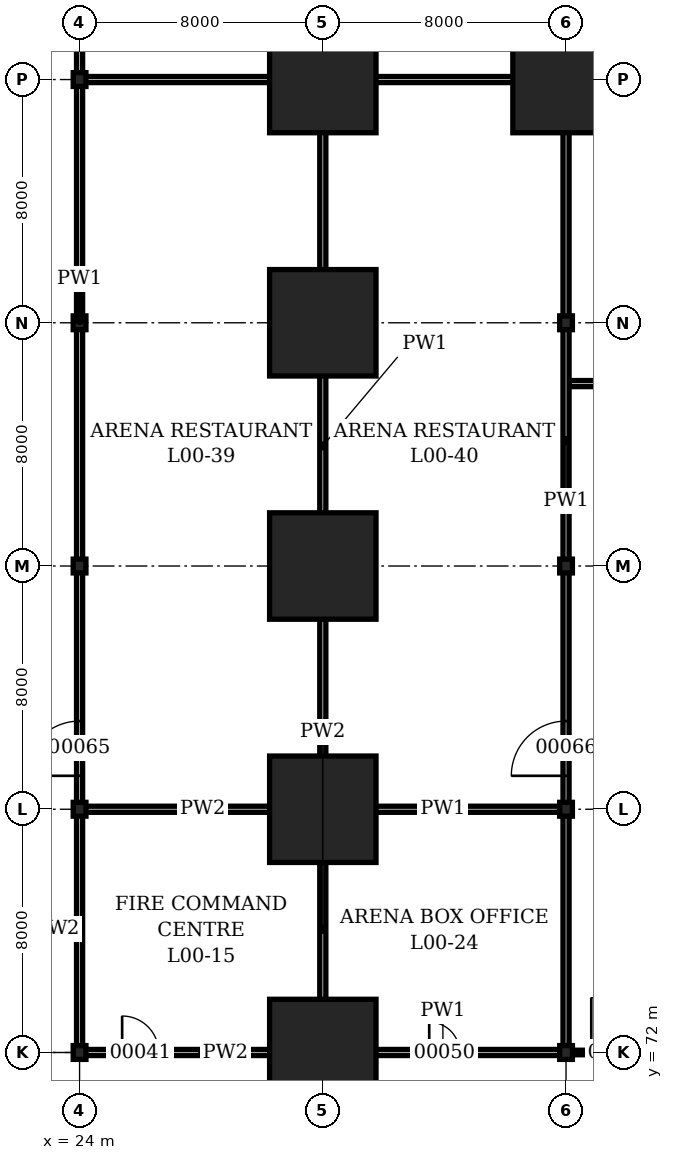
"""IFC4 building model, lengths in metres.
Left out: names, types, materials, properties, quantities, classifications, styles, units other than length and angle.
Written with IfcOpenShell. Run it as: python <this file> out.ifc"""

import sys

from ifc_helpers import new_model, si_unit, direction, frame, frame_2d, origin, origin_2d, place, context, subcontext, project, spatial, rectangle, hollow_rectangle, i_section, extrude, element, fill, save


model = new_model("IFC4")
c1 = context("Model", 3, precision=1e-05, world=origin(), true_north=direction((0.0, 1.0)))
c2 = subcontext(c1, "Body", "Model", "MODEL_VIEW")
j1 = project(units=[si_unit("LENGTHUNIT", "METRE"), si_unit("PLANEANGLEUNIT", "RADIAN")], contexts=[c1])
p1 = place(None, origin())
s1 = spatial("IfcSite", under=j1, at=p1, CompositionType="ELEMENT")
p2 = place(p1, origin())
s2 = spatial("IfcBuilding", under=s1, at=p2, CompositionType="ELEMENT")
p3 = place(p2, origin())
s3 = spatial("IfcBuildingStorey", under=s2, at=p3, CompositionType="ELEMENT", Elevation=0.0)
for number, where, z_axis, x_axis in (
    (1, (24.0, 72.0, 0.0), (0.0, 0.0, 1.0), (1.0, 0.0, 0.0)),
    (2, (24.0, 80.0, 0.0), (0.0, 0.0, 1.0), (1.0, 0.0, 0.0)),
    (3, (24.0, 88.0, 0.0), (0.0, 0.0, 1.0), (1.0, 0.0, 0.0)),
    (4, (24.0, 96.0, 0.0), (0.0, 0.0, 1.0), (1.0, 0.0, 0.0)),
    (5, (24.0, 104.0, 0.0), (0.0, 0.0, 1.0), (1.0, 0.0, 0.0)),
):
    element("IfcColumn", number, at=place(p3, frame(where, z_axis=z_axis, x_axis=x_axis)), inside=s3, PredefinedType="COLUMN", context=c2, shape_type="SweptSolid", body=[
        extrude(i_section(OverallWidth=0.419, OverallDepth=0.455, WebThickness=0.042, FlangeThickness=0.068, at=origin_2d()), origin(), (0.0, 0.0, 1.0), 4.9),
    ])
for number, where, z_axis, x_axis in (
    (6, (32.0, 72.0, 0.0), (0.0, 0.0, 1.0), (1.0, 0.0, 0.0)),
    (7, (32.0, 80.0, 0.0), (0.0, 0.0, 1.0), (1.0, 0.0, 0.0)),
    (8, (32.0, 88.0, 0.0), (0.0, 0.0, 1.0), (1.0, 0.0, 0.0)),
    (9, (32.0, 96.0, 0.0), (0.0, 0.0, 1.0), (1.0, 0.0, 0.0)),
    (10, (32.0, 104.0, 0.0), (0.0, 0.0, 1.0), (1.0, 0.0, 0.0)),
):
    element("IfcColumn", number, at=place(p3, frame(where, z_axis=z_axis, x_axis=x_axis)), inside=s3, PredefinedType="COLUMN", context=c2, shape_type="SweptSolid", body=[
        extrude(hollow_rectangle(XDim=3.5, YDim=3.5, WallThickness=0.5, at=origin_2d()), origin(), (0.0, 0.0, 1.0), 4.9),
    ])
for number, where, z_axis, x_axis in (
    (11, (40.0, 72.0, 0.0), (0.0, 0.0, 1.0), (1.0, 0.0, 0.0)),
    (12, (40.0, 80.0, 0.0), (0.0, 0.0, 1.0), (1.0, 0.0, 0.0)),
    (13, (40.0, 88.0, 0.0), (0.0, 0.0, 1.0), (1.0, 0.0, 0.0)),
    (14, (40.0, 96.0, 0.0), (0.0, 0.0, 1.0), (1.0, 0.0, 0.0)),
):
    element("IfcColumn", number, at=place(p3, frame(where, z_axis=z_axis, x_axis=x_axis)), inside=s3, PredefinedType="COLUMN", context=c2, shape_type="SweptSolid", body=[
        extrude(i_section(OverallWidth=0.419, OverallDepth=0.455, WebThickness=0.042, FlangeThickness=0.068, at=origin_2d()), origin(), (0.0, 0.0, 1.0), 4.9),
    ])
p4 = place(p3, frame((40.0, 104.0, 0.0), z_axis=(0.0, 0.0, 1.0), x_axis=(1.0, 0.0, 0.0)))
e15 = element("IfcColumn", 15, at=p4, inside=s3, PredefinedType="COLUMN", context=c2, shape_type="SweptSolid", body=[
    extrude(hollow_rectangle(XDim=3.5, YDim=3.5, WallThickness=0.5, at=origin_2d()), origin(), (0.0, 0.0, 1.0), 4.9),
])
p5 = place(p3, frame((24.1, 72.0, 0.0), z_axis=(0.0, 0.0, 1.0), x_axis=(1.0, 0.0, 0.0)))
e16 = element("IfcWall", 16, at=p5, inside=s3, PredefinedType="PARTITIONING", context=c2, shape_type="SweptSolid", body=[
    extrude(rectangle(XDim=7.9, YDim=0.2, at=frame_2d((3.95, 0.0))), origin(), (0.0, 0.0, 1.0), 3.928),
])
p6 = place(p5, frame((1.3, 0.0, 0.0)))
e17 = element("IfcOpeningElement", 17, at=p6, cuts=e16, PredefinedType="OPENING", context=c2, shape_type="SweptSolid", body=[
    extrude(rectangle(XDim=1.2, YDim=2.1, at=frame_2d((0.6, 1.05))), frame((0.0, 0.11, 0.0), z_axis=(0.0, -1.0, 0.0), x_axis=(1.0, 0.0, 0.0)), (0.0, 0.0, 1.0), 0.22),
])
p7 = place(p3, frame((32.0, 72.0, 0.0), z_axis=(0.0, 0.0, 1.0), x_axis=(1.0, 0.0, 0.0)))
e18 = element("IfcWall", 18, at=p7, inside=s3, PredefinedType="PARTITIONING", context=c2, shape_type="SweptSolid", body=[
    extrude(rectangle(XDim=7.9, YDim=0.2, at=frame_2d((3.95, 0.0))), origin(), (0.0, 0.0, 1.0), 3.928),
])
p8 = place(p7, frame((3.5, 0.0, 0.0)))
e19 = element("IfcOpeningElement", 19, at=p8, cuts=e18, PredefinedType="OPENING", context=c2, shape_type="SweptSolid", body=[
    extrude(rectangle(XDim=1.0, YDim=2.1, at=frame_2d((0.5, 1.05))), frame((0.0, 0.11, 0.0), z_axis=(0.0, -1.0, 0.0), x_axis=(1.0, 0.0, 0.0)), (0.0, 0.0, 1.0), 0.22),
])
for number, where, z_axis, x_axis in (
    (20, (24.1, 80.0, 0.0), (0.0, 0.0, 1.0), (1.0, 0.0, 0.0)),
    (21, (32.0, 80.0, 0.0), (0.0, 0.0, 1.0), (1.0, 0.0, 0.0)),
):
    element("IfcWall", number, at=place(p3, frame(where, z_axis=z_axis, x_axis=x_axis)), inside=s3, PredefinedType="PARTITIONING", context=c2, shape_type="SweptSolid", body=[
        extrude(rectangle(XDim=7.9, YDim=0.2, at=frame_2d((3.95, 0.0))), origin(), (0.0, 0.0, 1.0), 3.928),
    ])
p9 = place(p3, frame((40.1, 94.0, 0.0), z_axis=(0.0, 0.0, 1.0), x_axis=(1.0, 0.0, 0.0)))
e22 = element("IfcWall", 22, at=p9, inside=s3, PredefinedType="PARTITIONING", context=c2, shape_type="SweptSolid", body=[
    extrude(rectangle(XDim=31.8, YDim=0.2, at=frame_2d((15.9, 0.0))), origin(), (0.0, 0.0, 1.0), 4.7),
])
p10 = place(p9, frame((1.0, 0.0, 0.0)))
e23 = element("IfcOpeningElement", 23, at=p10, cuts=e22, PredefinedType="OPENING", context=c2, shape_type="SweptSolid", body=[
    extrude(rectangle(XDim=1.8, YDim=2.4, at=frame_2d((0.9, 1.2))), frame((0.0, 0.11, 0.0), z_axis=(0.0, -1.0, 0.0), x_axis=(1.0, 0.0, 0.0)), (0.0, 0.0, 1.0), 0.22),
])
p11 = place(p9, frame((17.4, 0.0, 0.0)))
e24 = element("IfcOpeningElement", 24, at=p11, cuts=e22, PredefinedType="OPENING", context=c2, shape_type="SweptSolid", body=[
    extrude(rectangle(XDim=1.0, YDim=2.1, at=frame_2d((0.5, 1.05))), frame((0.0, 0.11, 0.0), z_axis=(0.0, -1.0, 0.0), x_axis=(1.0, 0.0, 0.0)), (0.0, 0.0, 1.0), 0.22),
])
p12 = place(p9, frame((25.4, 0.0, 0.0)))
e25 = element("IfcOpeningElement", 25, at=p12, cuts=e22, PredefinedType="OPENING", context=c2, shape_type="SweptSolid", body=[
    extrude(rectangle(XDim=1.0, YDim=2.1, at=frame_2d((0.5, 1.05))), frame((0.0, 0.11, 0.0), z_axis=(0.0, -1.0, 0.0), x_axis=(1.0, 0.0, 0.0)), (0.0, 0.0, 1.0), 0.22),
])
p13 = place(p3, frame((24.1, 104.0, 0.0), z_axis=(0.0, 0.0, 1.0), x_axis=(1.0, 0.0, 0.0)))
e26 = element("IfcWall", 26, at=p13, inside=s3, PredefinedType="PARTITIONING", context=c2, shape_type="SweptSolid", body=[
    extrude(rectangle(XDim=47.8, YDim=0.2, at=frame_2d((23.9, 0.0))), origin(), (0.0, 0.0, 1.0), 3.928),
])
p14 = place(p13, frame((18.0, 0.0, 0.0)))
e27 = element("IfcOpeningElement", 27, at=p14, cuts=e26, PredefinedType="OPENING", context=c2, shape_type="SweptSolid", body=[
    extrude(rectangle(XDim=1.8, YDim=2.4, at=frame_2d((0.9, 1.2))), frame((0.0, 0.11, 0.0), z_axis=(0.0, -1.0, 0.0), x_axis=(1.0, 0.0, 0.0)), (0.0, 0.0, 1.0), 0.22),
])
p15 = place(p13, frame((34.15, 0.0, 0.0)))
e28 = element("IfcOpeningElement", 28, at=p15, cuts=e26, PredefinedType="OPENING", context=c2, shape_type="SweptSolid", body=[
    extrude(rectangle(XDim=1.0, YDim=2.1, at=frame_2d((0.5, 1.05))), frame((0.0, 0.11, 0.0), z_axis=(0.0, -1.0, 0.0), x_axis=(1.0, 0.0, 0.0)), (0.0, 0.0, 1.0), 0.22),
])
p16 = place(p3, frame((24.0, 72.1, 0.0), z_axis=(0.0, 0.0, 1.0), x_axis=(0.0, 1.0, 0.0)))
e29 = element("IfcWall", 29, at=p16, inside=s3, PredefinedType="PARTITIONING", context=c2, shape_type="SweptSolid", body=[
    extrude(rectangle(XDim=7.9, YDim=0.2, at=frame_2d((3.95, 0.0))), origin(), (0.0, 0.0, 1.0), 3.928),
])
p17 = place(p3, frame((24.0, 80.0, 0.0), z_axis=(0.0, 0.0, 1.0), x_axis=(0.0, 1.0, 0.0)))
e30 = element("IfcWall", 30, at=p17, inside=s3, PredefinedType="PARTITIONING", context=c2, shape_type="SweptSolid", body=[
    extrude(rectangle(XDim=32.15, YDim=0.2, at=frame_2d((16.075, 0.0))), origin(), (0.0, 0.0, 1.0), 3.928),
])
p18 = place(p17, frame((1.1, 0.0, 0.0)))
e31 = element("IfcOpeningElement", 31, at=p18, cuts=e30, PredefinedType="OPENING", context=c2, shape_type="SweptSolid", body=[
    extrude(rectangle(XDim=1.8, YDim=2.4, at=frame_2d((0.9, 1.2))), frame((0.0, 0.11, 0.0), z_axis=(0.0, -1.0, 0.0), x_axis=(1.0, 0.0, 0.0)), (0.0, 0.0, 1.0), 0.22),
])
p19 = place(p17, frame((25.5, 0.0, 0.0)))
e32 = element("IfcOpeningElement", 32, at=p19, cuts=e30, PredefinedType="OPENING", context=c2, shape_type="SweptSolid", body=[
    extrude(rectangle(XDim=1.0, YDim=2.1, at=frame_2d((0.5, 1.05))), frame((0.0, 0.11, 0.0), z_axis=(0.0, -1.0, 0.0), x_axis=(1.0, 0.0, 0.0)), (0.0, 0.0, 1.0), 0.22),
])
p20 = place(p3, frame((32.0, 72.1, 0.0), z_axis=(0.0, 0.0, 1.0), x_axis=(0.0, 1.0, 0.0)))
e33 = element("IfcWall", 33, at=p20, inside=s3, PredefinedType="PARTITIONING", context=c2, shape_type="SweptSolid", body=[
    extrude(rectangle(XDim=7.9, YDim=0.2, at=frame_2d((3.95, 0.0))), origin(), (0.0, 0.0, 1.0), 3.928),
])
p21 = place(p3, frame((32.0, 80.0, 0.0), z_axis=(0.0, 0.0, 1.0), x_axis=(0.0, 1.0, 0.0)))
e34 = element("IfcWall", 34, at=p21, inside=s3, PredefinedType="PARTITIONING", context=c2, shape_type="SweptSolid", body=[
    extrude(rectangle(XDim=23.9, YDim=0.2, at=frame_2d((11.95, 0.0))), origin(), (0.0, 0.0, 1.0), 3.928),
])
p22 = place(p3, frame((40.0, 72.1, 0.0), z_axis=(0.0, 0.0, 1.0), x_axis=(0.0, 1.0, 0.0)))
e35 = element("IfcWall", 35, at=p22, inside=s3, PredefinedType="PARTITIONING", context=c2, shape_type="SweptSolid", body=[
    extrude(rectangle(XDim=40.05, YDim=0.2, at=frame_2d((20.025, 0.0))), origin(), (0.0, 0.0, 1.0), 3.928),
])
p23 = place(p22, frame((9.0, 0.0, 0.0)))
e36 = element("IfcOpeningElement", 36, at=p23, cuts=e35, PredefinedType="OPENING", context=c2, shape_type="SweptSolid", body=[
    extrude(rectangle(XDim=1.8, YDim=2.4, at=frame_2d((0.9, 1.2))), frame((0.0, 0.11, 0.0), z_axis=(0.0, -1.0, 0.0), x_axis=(1.0, 0.0, 0.0)), (0.0, 0.0, 1.0), 0.22),
])
p24 = place(p3, frame((40.1, 72.0, 0.0), z_axis=(0.0, 0.0, 1.0), x_axis=(1.0, 0.0, 0.0)))
e37 = element("IfcWall", 37, at=p24, inside=s3, PredefinedType="PARTITIONING", context=c2, shape_type="SweptSolid", body=[
    extrude(rectangle(XDim=3.26, YDim=0.15, at=frame_2d((1.63, 0.0))), origin(), (0.0, 0.0, 1.0), 4.7),
])
p25 = place(p24, frame((0.73, 0.0, 0.0)))
e38 = element("IfcOpeningElement", 38, at=p25, cuts=e37, PredefinedType="OPENING", context=c2, shape_type="SweptSolid", body=[
    extrude(rectangle(XDim=1.8, YDim=2.4, at=frame_2d((0.9, 1.2))), frame((0.0, 0.085, 0.0), z_axis=(0.0, -1.0, 0.0), x_axis=(1.0, 0.0, 0.0)), (0.0, 0.0, 1.0), 0.17),
])
p26 = place(p6, origin())
e39 = element("IfcDoor", 39, at=p26, inside=s3, OperationType="SINGLE_SWING_LEFT", PredefinedType="DOOR", context=c2, shape_type="SweptSolid", body=[
    extrude(rectangle(XDim=1.2, YDim=2.1, at=frame_2d((0.6, 1.05))), frame((0.0, 0.1, 0.0), z_axis=(0.0, -1.0, 0.0), x_axis=(1.0, 0.0, 0.0)), (0.0, 0.0, 1.0), 0.199),
])
fill(e17, e39)
p27 = place(p8, origin())
e40 = element("IfcDoor", 40, at=p27, inside=s3, OperationType="SINGLE_SWING_LEFT", PredefinedType="DOOR", context=c2, shape_type="SweptSolid", body=[
    extrude(rectangle(XDim=1.0, YDim=2.1, at=frame_2d((0.5, 1.05))), frame((0.0, 0.1, 0.0), z_axis=(0.0, -1.0, 0.0), x_axis=(1.0, 0.0, 0.0)), (0.0, 0.0, 1.0), 0.199),
])
fill(e19, e40)
p28 = place(p18, origin())
e41 = element("IfcDoor", 41, at=p28, inside=s3, OperationType="DOUBLE_DOOR_DOUBLE_SWING", PredefinedType="DOOR", context=c2, shape_type="SweptSolid", body=[
    extrude(rectangle(XDim=1.8, YDim=2.4, at=frame_2d((0.9, 1.2))), frame((0.0, 0.1, 0.0), z_axis=(0.0, -1.0, 0.0), x_axis=(1.0, 0.0, 0.0)), (0.0, 0.0, 1.0), 0.199),
])
fill(e31, e41)
p29 = place(p23, origin())
e42 = element("IfcDoor", 42, at=p29, inside=s3, OperationType="DOUBLE_DOOR_DOUBLE_SWING", PredefinedType="DOOR", context=c2, shape_type="SweptSolid", body=[
    extrude(rectangle(XDim=1.8, YDim=2.4, at=frame_2d((0.9, 1.2))), frame((0.0, 0.1, 0.0), z_axis=(0.0, -1.0, 0.0), x_axis=(1.0, 0.0, 0.0)), (0.0, 0.0, 1.0), 0.199),
])
fill(e36, e42)
p30 = place(p25, origin())
e43 = element("IfcDoor", 43, at=p30, inside=s3, OperationType="DOUBLE_DOOR_DOUBLE_SWING", PredefinedType="DOOR", context=c2, shape_type="SweptSolid", body=[
    extrude(rectangle(XDim=1.8, YDim=2.4, at=frame_2d((0.9, 1.2))), frame((0.0, 0.075, 0.0), z_axis=(0.0, -1.0, 0.0), x_axis=(1.0, 0.0, 0.0)), (0.0, 0.0, 1.0), 0.149),
])
fill(e38, e43)
save(model, sys.argv[1])
